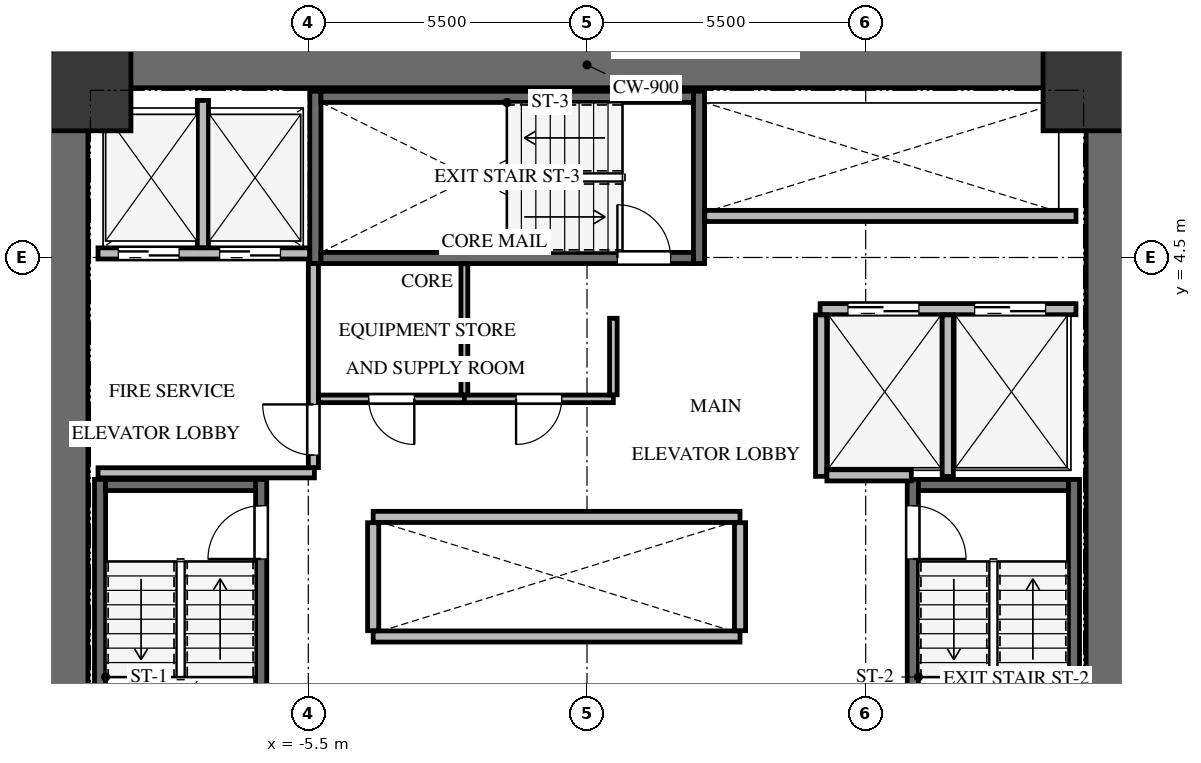
"""IFC4 building model, lengths in metres.
Left out: names, types, materials, properties, quantities, classifications, styles, units other than length and angle.
Written with IfcOpenShell. Run it as: python <this file> out.ifc"""

import sys

from ifc_helpers import new_model, si_unit, direction, frame, frame_2d, origin, origin_2d, place, context, subcontext, project, spatial, rectangle, extrude, source, transform, mapped, element, fill, save


model = new_model("IFC4")
c1 = context("Model", 3, precision=1e-05, world=origin(), true_north=direction((0.0, 1.0)))
c2 = subcontext(c1, "Body", "Model", "MODEL_VIEW")
j1 = project(units=[si_unit("LENGTHUNIT", "METRE"), si_unit("PLANEANGLEUNIT", "RADIAN")], contexts=[c1])
p1 = place(None, origin())
s1 = spatial("IfcSite", under=j1, at=p1, CompositionType="ELEMENT")
p2 = place(p1, origin())
s2 = spatial("IfcBuilding", under=s1, at=p2, CompositionType="ELEMENT")
p3 = place(p2, frame((0.0, 0.0, 75.3)))
s3 = spatial("IfcBuildingStorey", under=s2, at=p3, CompositionType="ELEMENT", Elevation=75.3)
for number, where, z_axis, x_axis in (
    (1, (-10.3, -8.75, 0.0), (0.0, 0.0, 1.0), (0.0, 1.0, 0.0)),
    (2, (10.3, -8.75, 0.0), (0.0, 0.0, 1.0), (0.0, 1.0, 0.0)),
):
    element("IfcWall", number, at=place(p3, frame(where, z_axis=z_axis, x_axis=x_axis)), inside=s3, PredefinedType="SHEAR", context=c2, shape_type="SweptSolid", body=[
        extrude(rectangle(XDim=17.5, YDim=0.9, at=frame_2d((8.75, 0.0))), origin(), (0.0, 0.0, 1.0), 3.0),
    ])
p4 = place(p3, frame((-9.85, 8.3, 0.0), z_axis=(0.0, 0.0, 1.0), x_axis=(1.0, 0.0, 0.0)))
e3 = element("IfcWall", 3, at=p4, inside=s3, PredefinedType="SHEAR", context=c2, shape_type="SweptSolid", body=[
    extrude(rectangle(XDim=19.7, YDim=0.9, at=frame_2d((9.85, 0.0))), origin(), (0.0, 0.0, 1.0), 3.0),
])
p5 = place(p3, frame((-6.43, -7.77, -0.24), z_axis=(0.0, 0.0, 1.0), x_axis=(0.0, 1.0, 0.0)))
e4 = element("IfcWall", 4, at=p5, inside=s3, PredefinedType="SHEAR", context=c2, shape_type="SweptSolid", body=[
    extrude(rectangle(XDim=7.89, YDim=0.22, at=frame_2d((3.945, 0.0))), origin(), (0.0, 0.0, 1.0), 3.0),
])
p6 = place(p5, frame((6.32, 0.0, 0.0)))
e5 = element("IfcOpeningElement", 5, at=p6, cuts=e4, PredefinedType="OPENING", context=c2, shape_type="SweptSolid", body=[
    extrude(rectangle(XDim=1.05, YDim=2.15, at=frame_2d((0.525, 1.075))), frame((0.0, 0.12, 0.0), z_axis=(0.0, -1.0, 0.0), x_axis=(1.0, 0.0, 0.0)), (0.0, 0.0, 1.0), 0.24),
])
p7 = place(p3, frame((-9.61, 0.12, -0.24), z_axis=(0.0, 0.0, 1.0), x_axis=(0.0, -1.0, 0.0)))
e6 = element("IfcWall", 6, at=p7, inside=s3, PredefinedType="SHEAR", context=c2, shape_type="SweptSolid", body=[
    extrude(rectangle(XDim=7.89, YDim=0.22, at=frame_2d((3.945, 0.0))), origin(), (0.0, 0.0, 1.0), 3.0),
])
p8 = place(p3, frame((-6.54, 0.01, -0.24), z_axis=(0.0, 0.0, 1.0), x_axis=(-1.0, 0.0, 0.0)))
e7 = element("IfcWall", 7, at=p8, inside=s3, PredefinedType="SHEAR", context=c2, shape_type="SweptSolid", body=[
    extrude(rectangle(XDim=2.96, YDim=0.22, at=frame_2d((1.48, 0.0))), origin(), (0.0, 0.0, 1.0), 3.0),
])
p9 = place(p3, frame((9.61, -7.77, -0.24), z_axis=(0.0, 0.0, 1.0), x_axis=(0.0, 1.0, 0.0)))
e8 = element("IfcWall", 8, at=p9, inside=s3, PredefinedType="SHEAR", context=c2, shape_type="SweptSolid", body=[
    extrude(rectangle(XDim=7.89, YDim=0.22, at=frame_2d((3.945, 0.0))), origin(), (0.0, 0.0, 1.0), 3.0),
])
p10 = place(p3, frame((6.43, 0.12, -0.24), z_axis=(0.0, 0.0, 1.0), x_axis=(0.0, -1.0, 0.0)))
e9 = element("IfcWall", 9, at=p10, inside=s3, PredefinedType="SHEAR", context=c2, shape_type="SweptSolid", body=[
    extrude(rectangle(XDim=7.89, YDim=0.22, at=frame_2d((3.945, 0.0))), origin(), (0.0, 0.0, 1.0), 3.0),
])
p11 = place(p10, frame((0.52, 0.0, 0.0)))
e10 = element("IfcOpeningElement", 10, at=p11, cuts=e9, PredefinedType="OPENING", context=c2, shape_type="SweptSolid", body=[
    extrude(rectangle(XDim=1.05, YDim=2.15, at=frame_2d((0.525, 1.075))), frame((0.0, 0.12, 0.0), z_axis=(0.0, -1.0, 0.0), x_axis=(1.0, 0.0, 0.0)), (0.0, 0.0, 1.0), 0.24),
])
p12 = place(p3, frame((9.5, 0.01, -0.24), z_axis=(0.0, 0.0, 1.0), x_axis=(-1.0, 0.0, 0.0)))
e11 = element("IfcWall", 11, at=p12, inside=s3, PredefinedType="SHEAR", context=c2, shape_type="SweptSolid", body=[
    extrude(rectangle(XDim=2.96, YDim=0.22, at=frame_2d((1.48, 0.0))), origin(), (0.0, 0.0, 1.0), 3.0),
])
for number, where, z_axis, x_axis in (
    (12, (2.21, 4.38, -0.24), (0.0, 0.0, 1.0), (0.0, 1.0, 0.0)),
    (13, (-5.36, 7.78, -0.24), (0.0, 0.0, 1.0), (0.0, -1.0, 0.0)),
):
    element("IfcWall", number, at=place(p3, frame(where, z_axis=z_axis, x_axis=x_axis)), inside=s3, PredefinedType="SHEAR", context=c2, shape_type="SweptSolid", body=[
        extrude(rectangle(XDim=3.4, YDim=0.22, at=frame_2d((1.7, 0.0))), origin(), (0.0, 0.0, 1.0), 3.0),
    ])
p13 = place(p3, frame((-5.25, 4.49, -0.24), z_axis=(0.0, 0.0, 1.0), x_axis=(1.0, 0.0, 0.0)))
e14 = element("IfcWall", 14, at=p13, inside=s3, PredefinedType="SHEAR", context=c2, shape_type="SweptSolid", body=[
    extrude(rectangle(XDim=7.35, YDim=0.22, at=frame_2d((3.675, 0.0))), origin(), (0.0, 0.0, 1.0), 3.0),
])
p14 = place(p13, frame((5.85, 0.0, 0.0)))
e15 = element("IfcOpeningElement", 15, at=p14, cuts=e14, PredefinedType="OPENING", context=c2, shape_type="SweptSolid", body=[
    extrude(rectangle(XDim=1.05, YDim=2.15, at=frame_2d((0.525, 1.075))), frame((0.0, 0.12, 0.0), z_axis=(0.0, -1.0, 0.0), x_axis=(1.0, 0.0, 0.0)), (0.0, 0.0, 1.0), 0.24),
])
p15 = place(p3, frame((2.1, 7.67, -0.24), z_axis=(0.0, 0.0, 1.0), x_axis=(-1.0, 0.0, 0.0)))
e16 = element("IfcWall", 16, at=p15, inside=s3, PredefinedType="SHEAR", context=c2, shape_type="SweptSolid", body=[
    extrude(rectangle(XDim=7.35, YDim=0.22, at=frame_2d((3.675, 0.0))), origin(), (0.0, 0.0, 1.0), 3.0),
])
m1 = source(origin(), c2, "Body", "SweptSolid", [
    extrude(rectangle(XDim=1.6, YDim=1.6, at=origin_2d()), origin(), (0.0, 0.0, 1.0), 3.0),
])
for number, where, z_axis, x_axis in (
    (17, (9.8, 7.8, -0.24), (0.0, 0.0, 1.0), (1.0, 0.0, 0.0)),
    (18, (-9.8, 7.8, -0.24), (0.0, 0.0, 1.0), (1.0, 0.0, 0.0)),
):
    element("IfcColumn", number, at=place(p3, frame(where, z_axis=z_axis, x_axis=x_axis)), inside=s3, PredefinedType="COLUMN", context=c2, shape_type="MappedRepresentation", body=[
        mapped(m1, transform((0.0, 0.0, 0.0), x_axis=(1.0, 0.0, 0.0), y_axis=(0.0, 1.0, 0.0), z_axis=(0.0, 0.0, 1.0), scale=1.0)),
    ])
p16 = place(p3, frame((-9.65, 4.58, 0.0), z_axis=(0.0, 0.0, 1.0), x_axis=(1.0, 0.0, 0.0)))
e19 = element("IfcWall", 19, at=p16, inside=s3, PredefinedType="SOLIDWALL", context=c2, shape_type="SweptSolid", body=[
    extrude(rectangle(XDim=4.175, YDim=0.22, at=frame_2d((2.087, 0.0))), origin(), (0.0, 0.0, 1.0), 2.745),
])
p17 = place(p16, frame((0.4, 0.0, 0.0)))
e20 = element("IfcOpeningElement", 20, at=p17, cuts=e19, PredefinedType="OPENING", context=c2, shape_type="SweptSolid", body=[
    extrude(rectangle(XDim=1.2, YDim=2.15, at=frame_2d((0.6, 1.075))), frame((0.0, 0.12, 0.0), z_axis=(0.0, -1.0, 0.0), x_axis=(1.0, 0.0, 0.0)), (0.0, 0.0, 1.0), 0.24),
])
p18 = place(p16, frame((2.4, 0.0, 0.0)))
e21 = element("IfcOpeningElement", 21, at=p18, cuts=e19, PredefinedType="OPENING", context=c2, shape_type="SweptSolid", body=[
    extrude(rectangle(XDim=1.2, YDim=2.15, at=frame_2d((0.6, 1.075))), frame((0.0, 0.12, 0.0), z_axis=(0.0, -1.0, 0.0), x_axis=(1.0, 0.0, 0.0)), (0.0, 0.0, 1.0), 0.24),
])
p19 = place(p3, frame((-7.58, 4.694, 0.0), z_axis=(0.0, 0.0, 1.0), x_axis=(0.0, 1.0, 0.0)))
e22 = element("IfcWall", 22, at=p19, inside=s3, PredefinedType="SOLIDWALL", context=c2, shape_type="SweptSolid", body=[
    extrude(rectangle(XDim=2.906, YDim=0.22, at=frame_2d((1.453, 0.0))), origin(), (0.0, 0.0, 1.0), 2.745),
])
p20 = place(p3, frame((-9.65, 0.25, 0.0), z_axis=(0.0, 0.0, 1.0), x_axis=(1.0, 0.0, 0.0)))
e23 = element("IfcWall", 23, at=p20, inside=s3, PredefinedType="SOLIDWALL", context=c2, shape_type="SweptSolid", body=[
    extrude(rectangle(XDim=4.27, YDim=0.2, at=frame_2d((2.135, 0.0))), origin(), (0.0, 0.0, 1.0), 2.745),
])
p21 = place(p3, frame((-5.4, 0.354, 0.0), z_axis=(0.0, 0.0, 1.0), x_axis=(0.0, 1.0, 0.0)))
e24 = element("IfcWall", 24, at=p21, inside=s3, PredefinedType="SOLIDWALL", context=c2, shape_type="SweptSolid", body=[
    extrude(rectangle(XDim=4.026, YDim=0.2, at=frame_2d((2.013, 0.0))), origin(), (0.0, 0.0, 1.0), 2.745),
])
p22 = place(p21, frame((0.246, 0.0, 0.0)))
e25 = element("IfcOpeningElement", 25, at=p22, cuts=e24, PredefinedType="OPENING", context=c2, shape_type="SweptSolid", body=[
    extrude(rectangle(XDim=1.0, YDim=2.15, at=frame_2d((0.5, 1.075))), frame((0.0, 0.11, 0.0), z_axis=(0.0, -1.0, 0.0), x_axis=(1.0, 0.0, 0.0)), (0.0, 0.0, 1.0), 0.22),
])
p23 = place(p3, frame((4.6, 3.48, 0.0), z_axis=(0.0, 0.0, 1.0), x_axis=(1.0, 0.0, 0.0)))
e26 = element("IfcWall", 26, at=p23, inside=s3, PredefinedType="SOLIDWALL", context=c2, shape_type="SweptSolid", body=[
    extrude(rectangle(XDim=5.05, YDim=0.22, at=frame_2d((2.525, 0.0))), origin(), (0.0, 0.0, 1.0), 2.745),
])
p24 = place(p23, frame((0.55, 0.0, 0.0)))
e27 = element("IfcOpeningElement", 27, at=p24, cuts=e26, PredefinedType="OPENING", context=c2, shape_type="SweptSolid", body=[
    extrude(rectangle(XDim=1.4, YDim=2.15, at=frame_2d((0.7, 1.075))), frame((0.0, 0.12, 0.0), z_axis=(0.0, -1.0, 0.0), x_axis=(1.0, 0.0, 0.0)), (0.0, 0.0, 1.0), 0.24),
])
p25 = place(p23, frame((3.05, 0.0, 0.0)))
e28 = element("IfcOpeningElement", 28, at=p25, cuts=e26, PredefinedType="OPENING", context=c2, shape_type="SweptSolid", body=[
    extrude(rectangle(XDim=1.4, YDim=2.15, at=frame_2d((0.7, 1.075))), frame((0.0, 0.12, 0.0), z_axis=(0.0, -1.0, 0.0), x_axis=(1.0, 0.0, 0.0)), (0.0, 0.0, 1.0), 0.24),
])
for number, where, z_axis, x_axis in (
    (29, (4.62, 0.18, 0.0), (0.0, 0.0, 1.0), (0.0, 1.0, 0.0)),
    (30, (7.12, 0.18, 0.0), (0.0, 0.0, 1.0), (0.0, 1.0, 0.0)),
):
    element("IfcWall", number, at=place(p3, frame(where, z_axis=z_axis, x_axis=x_axis)), inside=s3, PredefinedType="SOLIDWALL", context=c2, shape_type="SweptSolid", body=[
        extrude(rectangle(XDim=3.186, YDim=0.22, at=frame_2d((1.593, 0.0))), origin(), (0.0, 0.0, 1.0), 2.745),
    ])
p26 = place(p3, frame((4.734, 0.2, 0.0), z_axis=(0.0, 0.0, 1.0), x_axis=(1.0, 0.0, 0.0)))
e31 = element("IfcWall", 31, at=p26, inside=s3, PredefinedType="SOLIDWALL", context=c2, shape_type="SweptSolid", body=[
    extrude(rectangle(XDim=1.666, YDim=0.22, at=frame_2d((0.833, 0.0))), origin(), (0.0, 0.0, 1.0), 2.745),
])
for number, where, z_axis, x_axis in (
    (32, (-4.22, -2.98, 0.0), (0.0, 0.0, 1.0), (1.0, 0.0, 0.0)),
    (33, (-4.22, -0.62, 0.0), (0.0, 0.0, 1.0), (1.0, 0.0, 0.0)),
):
    element("IfcWall", number, at=place(p3, frame(where, z_axis=z_axis, x_axis=x_axis)), inside=s3, PredefinedType="SOLIDWALL", context=c2, shape_type="SweptSolid", body=[
        extrude(rectangle(XDim=7.24, YDim=0.22, at=frame_2d((3.62, 0.0))), origin(), (0.0, 0.0, 1.0), 2.745),
    ])
for number, where, z_axis, x_axis in (
    (34, (-4.22, -2.866, 0.0), (0.0, 0.0, 1.0), (0.0, 1.0, 0.0)),
    (35, (3.02, -2.866, 0.0), (0.0, 0.0, 1.0), (0.0, 1.0, 0.0)),
):
    element("IfcWall", number, at=place(p3, frame(where, z_axis=z_axis, x_axis=x_axis)), inside=s3, PredefinedType="SOLIDWALL", context=c2, shape_type="SweptSolid", body=[
        extrude(rectangle(XDim=2.132, YDim=0.22, at=frame_2d((1.066, 0.0))), origin(), (0.0, 0.0, 1.0), 2.745),
    ])
p27 = place(p3, frame((2.325, 5.32, 0.0), z_axis=(0.0, 0.0, 1.0), x_axis=(1.0, 0.0, 0.0)))
e36 = element("IfcWall", 36, at=p27, inside=s3, PredefinedType="SOLIDWALL", context=c2, shape_type="SweptSolid", body=[
    extrude(rectangle(XDim=7.325, YDim=0.22, at=frame_2d((3.663, 0.0))), origin(), (0.0, 0.0, 1.0), 2.745),
])
p28 = place(p3, frame((-2.42, 1.71, 0.0), z_axis=(0.0, 0.0, 1.0), x_axis=(-1.0, 0.0, 0.0)))
e37 = element("IfcWall", 37, at=p28, inside=s3, PredefinedType="PARTITIONING", context=c2, shape_type="SweptSolid", body=[
    extrude(rectangle(XDim=2.876, YDim=0.15, at=frame_2d((1.438, 0.0))), origin(), (0.0, 0.0, 1.0), 2.745),
])
p29 = place(p28, frame((0.988, 0.0, 0.0)))
e38 = element("IfcOpeningElement", 38, at=p29, cuts=e37, PredefinedType="OPENING", context=c2, shape_type="SweptSolid", body=[
    extrude(rectangle(XDim=0.9, YDim=2.05, at=frame_2d((0.45, 1.025))), frame((0.0, 0.085, 0.0), z_axis=(0.0, -1.0, 0.0), x_axis=(1.0, 0.0, 0.0)), (0.0, 0.0, 1.0), 0.17),
])
p30 = place(p3, frame((0.52, 1.71, 0.0), z_axis=(0.0, 0.0, 1.0), x_axis=(-1.0, 0.0, 0.0)))
e39 = element("IfcWall", 39, at=p30, inside=s3, PredefinedType="PARTITIONING", context=c2, shape_type="SweptSolid", body=[
    extrude(rectangle(XDim=2.94, YDim=0.15, at=frame_2d((1.47, 0.0))), origin(), (0.0, 0.0, 1.0), 2.745),
])
p31 = place(p30, frame((1.02, 0.0, 0.0)))
e40 = element("IfcOpeningElement", 40, at=p31, cuts=e39, PredefinedType="OPENING", context=c2, shape_type="SweptSolid", body=[
    extrude(rectangle(XDim=0.9, YDim=2.05, at=frame_2d((0.45, 1.025))), frame((0.0, 0.085, 0.0), z_axis=(0.0, -1.0, 0.0), x_axis=(1.0, 0.0, 0.0)), (0.0, 0.0, 1.0), 0.17),
])
p32 = place(p3, frame((0.52, 3.3, 0.0), z_axis=(0.0, 0.0, 1.0), x_axis=(0.0, -1.0, 0.0)))
e41 = element("IfcWall", 41, at=p32, inside=s3, PredefinedType="PARTITIONING", context=c2, shape_type="SweptSolid", body=[
    extrude(rectangle(XDim=1.511, YDim=0.15, at=frame_2d((0.755, 0.0))), origin(), (0.0, 0.0, 1.0), 2.745),
])
p33 = place(p3, frame((-2.42, 4.375, 0.0), z_axis=(0.0, 0.0, 1.0), x_axis=(0.0, -1.0, 0.0)))
e42 = element("IfcWall", 42, at=p33, inside=s3, PredefinedType="PARTITIONING", context=c2, shape_type="SweptSolid", body=[
    extrude(rectangle(XDim=2.586, YDim=0.135, at=frame_2d((1.293, 0.0))), origin(), (0.0, 0.0, 1.0), 2.745),
])
m2 = source(origin(), c2, "Body", "SweptSolid", [
    extrude(rectangle(XDim=1.05, YDim=2.15, at=frame_2d((0.525, 1.075))), frame((0.0, 0.025, 0.0), z_axis=(0.0, -1.0, 0.0), x_axis=(1.0, 0.0, 0.0)), (0.0, 0.0, 1.0), 0.05),
])
p34 = place(p6, origin())
e43 = element("IfcDoor", 43, at=p34, inside=s3, OperationType="SINGLE_SWING_LEFT", PredefinedType="DOOR", context=c2, shape_type="MappedRepresentation", body=[
    mapped(m2, transform((0.0, 0.0, 0.0), x_axis=(1.0, 0.0, 0.0), y_axis=(0.0, 1.0, 0.0), z_axis=(0.0, 0.0, 1.0), scale=1.0)),
])
fill(e5, e43)
m3 = source(origin(), c2, "Body", "SweptSolid", [
    extrude(rectangle(XDim=1.05, YDim=2.15, at=frame_2d((0.525, 1.075))), frame((0.0, 0.025, 0.0), z_axis=(0.0, -1.0, 0.0), x_axis=(1.0, 0.0, 0.0)), (0.0, 0.0, 1.0), 0.05),
])
p35 = place(p11, origin())
e44 = element("IfcDoor", 44, at=p35, inside=s3, OperationType="SINGLE_SWING_RIGHT", PredefinedType="DOOR", context=c2, shape_type="MappedRepresentation", body=[
    mapped(m3, transform((0.0, 0.0, 0.0), x_axis=(1.0, 0.0, 0.0), y_axis=(0.0, 1.0, 0.0), z_axis=(0.0, 0.0, 1.0), scale=1.0)),
])
fill(e10, e44)
p36 = place(p14, origin())
e45 = element("IfcDoor", 45, at=p36, inside=s3, OperationType="SINGLE_SWING_LEFT", PredefinedType="DOOR", context=c2, shape_type="MappedRepresentation", body=[
    mapped(m2, transform((0.0, 0.0, 0.0), x_axis=(1.0, 0.0, 0.0), y_axis=(0.0, 1.0, 0.0), z_axis=(0.0, 0.0, 1.0), scale=1.0)),
])
fill(e15, e45)
m4 = source(origin(), c2, "Body", "SweptSolid", [
    extrude(rectangle(XDim=1.2, YDim=2.15, at=frame_2d((0.6, 1.075))), frame((0.0, 0.025, 0.0), z_axis=(0.0, -1.0, 0.0), x_axis=(1.0, 0.0, 0.0)), (0.0, 0.0, 1.0), 0.05),
])
p37 = place(p17, origin())
e46 = element("IfcDoor", 46, at=p37, inside=s3, OperationType="DOUBLE_DOOR_SLIDING", PredefinedType="DOOR", context=c2, shape_type="MappedRepresentation", body=[
    mapped(m4, transform((0.0, 0.0, 0.0), x_axis=(1.0, 0.0, 0.0), y_axis=(0.0, 1.0, 0.0), z_axis=(0.0, 0.0, 1.0), scale=1.0)),
])
fill(e20, e46)
p38 = place(p18, origin())
e47 = element("IfcDoor", 47, at=p38, inside=s3, OperationType="DOUBLE_DOOR_SLIDING", PredefinedType="DOOR", context=c2, shape_type="MappedRepresentation", body=[
    mapped(m4, transform((0.0, 0.0, 0.0), x_axis=(1.0, 0.0, 0.0), y_axis=(0.0, 1.0, 0.0), z_axis=(0.0, 0.0, 1.0), scale=1.0)),
])
fill(e21, e47)
m5 = source(origin(), c2, "Body", "SweptSolid", [
    extrude(rectangle(XDim=1.0, YDim=2.15, at=frame_2d((0.5, 1.075))), frame((0.0, 0.025, 0.0), z_axis=(0.0, -1.0, 0.0), x_axis=(1.0, 0.0, 0.0)), (0.0, 0.0, 1.0), 0.05),
])
p39 = place(p22, origin())
e48 = element("IfcDoor", 48, at=p39, inside=s3, OperationType="SINGLE_SWING_RIGHT", PredefinedType="DOOR", context=c2, shape_type="MappedRepresentation", body=[
    mapped(m5, transform((0.0, 0.0, 0.0), x_axis=(1.0, 0.0, 0.0), y_axis=(0.0, 1.0, 0.0), z_axis=(0.0, 0.0, 1.0), scale=1.0)),
])
fill(e25, e48)
m6 = source(origin(), c2, "Body", "SweptSolid", [
    extrude(rectangle(XDim=1.4, YDim=2.15, at=frame_2d((0.7, 1.075))), frame((0.0, 0.025, 0.0), z_axis=(0.0, -1.0, 0.0), x_axis=(1.0, 0.0, 0.0)), (0.0, 0.0, 1.0), 0.05),
])
p40 = place(p24, origin())
e49 = element("IfcDoor", 49, at=p40, inside=s3, OperationType="DOUBLE_DOOR_SLIDING", PredefinedType="DOOR", context=c2, shape_type="MappedRepresentation", body=[
    mapped(m6, transform((0.0, 0.0, 0.0), x_axis=(1.0, 0.0, 0.0), y_axis=(0.0, 1.0, 0.0), z_axis=(0.0, 0.0, 1.0), scale=1.0)),
])
fill(e27, e49)
p41 = place(p25, origin())
e50 = element("IfcDoor", 50, at=p41, inside=s3, OperationType="DOUBLE_DOOR_SLIDING", PredefinedType="DOOR", context=c2, shape_type="MappedRepresentation", body=[
    mapped(m6, transform((0.0, 0.0, 0.0), x_axis=(1.0, 0.0, 0.0), y_axis=(0.0, 1.0, 0.0), z_axis=(0.0, 0.0, 1.0), scale=1.0)),
])
fill(e28, e50)
m7 = source(origin(), c2, "Body", "SweptSolid", [
    extrude(rectangle(XDim=0.9, YDim=2.05, at=frame_2d((0.45, 1.025))), frame((0.0, 0.025, 0.0), z_axis=(0.0, -1.0, 0.0), x_axis=(1.0, 0.0, 0.0)), (0.0, 0.0, 1.0), 0.05),
])
p42 = place(p29, origin())
e51 = element("IfcDoor", 51, at=p42, inside=s3, OperationType="SINGLE_SWING_LEFT", PredefinedType="DOOR", context=c2, shape_type="MappedRepresentation", body=[
    mapped(m7, transform((0.0, 0.0, 0.0), x_axis=(1.0, 0.0, 0.0), y_axis=(0.0, 1.0, 0.0), z_axis=(0.0, 0.0, 1.0), scale=1.0)),
])
fill(e38, e51)
m8 = source(origin(), c2, "Body", "SweptSolid", [
    extrude(rectangle(XDim=0.9, YDim=2.05, at=frame_2d((0.45, 1.025))), frame((0.0, 0.025, 0.0), z_axis=(0.0, -1.0, 0.0), x_axis=(1.0, 0.0, 0.0)), (0.0, 0.0, 1.0), 0.05),
])
p43 = place(p31, origin())
e52 = element("IfcDoor", 52, at=p43, inside=s3, OperationType="SINGLE_SWING_RIGHT", PredefinedType="DOOR", context=c2, shape_type="MappedRepresentation", body=[
    mapped(m8, transform((0.0, 0.0, 0.0), x_axis=(1.0, 0.0, 0.0), y_axis=(0.0, 1.0, 0.0), z_axis=(0.0, 0.0, 1.0), scale=1.0)),
])
fill(e40, e52)
save(model, sys.argv[1])
